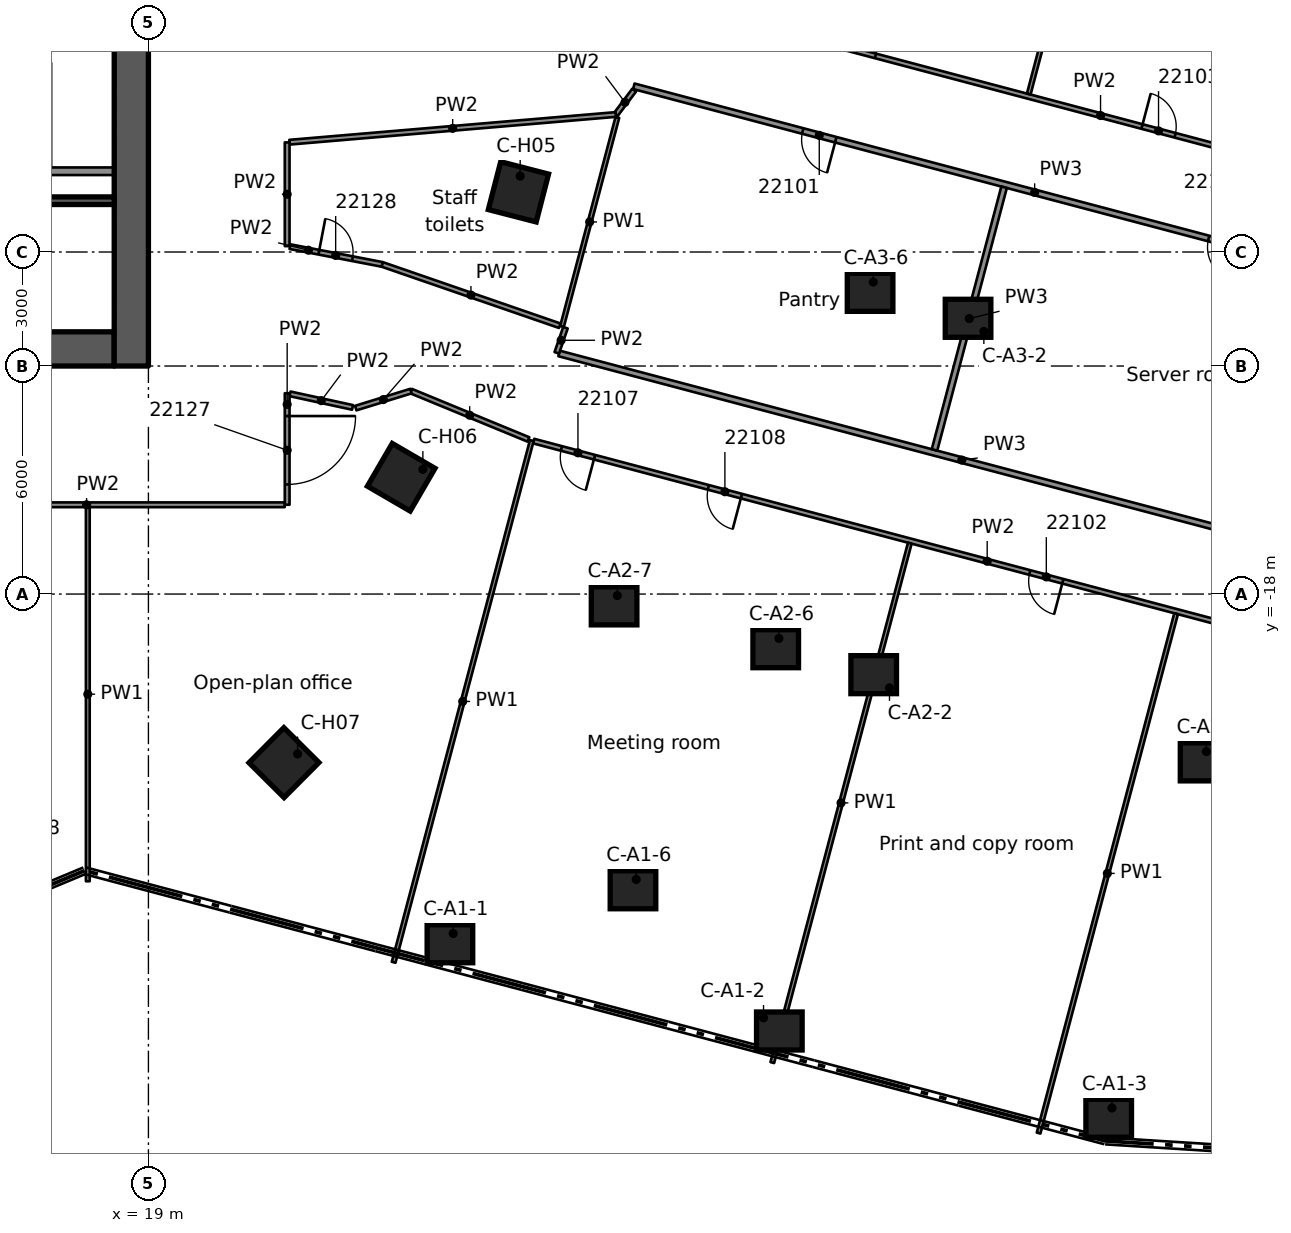
"""IFC4 building model, lengths in metres.
Left out: names, types, materials, properties, quantities, classifications, styles, units other than length and angle.
Written with IfcOpenShell. Run it as: python <this file> out.ifc"""

import sys

from ifc_helpers import new_model, si_unit, direction, frame, frame_2d, origin, origin_2d, place, context, subcontext, project, spatial, rectangle, extrude, element, fill, save


model = new_model("IFC4")
c1 = context("Model", 3, precision=1e-05, world=origin(), true_north=direction((0.0, 1.0)))
c2 = subcontext(c1, "Body", "Model", "MODEL_VIEW")
j1 = project(units=[si_unit("LENGTHUNIT", "METRE"), si_unit("PLANEANGLEUNIT", "RADIAN")], contexts=[c1])
p1 = place(None, origin())
s1 = spatial("IfcSite", under=j1, at=p1, CompositionType="ELEMENT")
p2 = place(p1, origin())
s2 = spatial("IfcBuilding", under=s1, at=p2, CompositionType="ELEMENT")
p3 = place(p2, frame((0.0, 0.0, 116.2)))
s3 = spatial("IfcBuildingStorey", under=s2, at=p3, CompositionType="ELEMENT", Elevation=116.2)
p4 = place(p3, frame((8.9, -11.55, 0.0), z_axis=(0.0, 0.0, 1.0), x_axis=(1.0, 0.0, 0.0)))
e1 = element("IfcWall", 1, at=p4, inside=s3, PredefinedType="SHEAR", context=c2, shape_type="SweptSolid", body=[
    extrude(rectangle(XDim=9.2, YDim=0.9, at=frame_2d((4.6, 0.0))), origin(), (0.0, 0.0, 1.0), 3.5),
])
p5 = place(p4, frame((3.0, 0.0, 0.0)))
e2 = element("IfcOpeningElement", 2, at=p5, cuts=e1, PredefinedType="OPENING", context=c2, shape_type="SweptSolid", body=[
    extrude(rectangle(XDim=1.1, YDim=2.1, at=frame_2d((0.55, 1.05))), frame((0.0, 0.46, 0.0), z_axis=(0.0, -1.0, 0.0), x_axis=(1.0, 0.0, 0.0)), (0.0, 0.0, 1.0), 0.92),
])
p6 = place(p3, frame((18.55, -12.0, 0.0), z_axis=(0.0, 0.0, 1.0), x_axis=(0.0, 1.0, 0.0)))
e3 = element("IfcWall", 3, at=p6, inside=s3, PredefinedType="SHEAR", context=c2, shape_type="SweptSolid", body=[
    extrude(rectangle(XDim=24.0, YDim=0.9, at=frame_2d((12.0, 0.0))), origin(), (0.0, 0.0, 1.0), 3.5),
])
p7 = place(p6, frame((12.1, 0.0, 0.0)))
e4 = element("IfcOpeningElement", 4, at=p7, cuts=e3, PredefinedType="OPENING", context=c2, shape_type="SweptSolid", body=[
    extrude(rectangle(XDim=1.8, YDim=2.1, at=frame_2d((0.9, 1.05))), frame((0.0, 0.46, 0.0), z_axis=(0.0, -1.0, 0.0), x_axis=(1.0, 0.0, 0.0)), (0.0, 0.0, 1.0), 0.92),
])
for number, where, z_axis, x_axis in (
    (5, (26.934, -27.202, 0.0), (0.0, 0.0, 1.0), (1.0, 0.0, 0.0)),
    (6, (35.602, -29.497, 0.0), (0.0, 0.0, 1.0), (1.0, 0.0, 0.0)),
    (7, (44.269, -31.793, 0.0), (0.0, 0.0, 1.0), (1.0, 0.0, 0.0)),
    (8, (31.751, -25.781, 0.0), (0.0, 0.0, 1.0), (1.0, 0.0, 0.0)),
    (9, (38.085, -20.121, 0.0), (0.0, 0.0, 1.0), (1.0, 0.0, 0.0)),
    (10, (46.753, -22.416, 0.0), (0.0, 0.0, 1.0), (1.0, 0.0, 0.0)),
    (11, (35.507, -19.438, 0.0), (0.0, 0.0, 1.0), (1.0, 0.0, 0.0)),
    (12, (31.254, -18.311, 0.0), (0.0, 0.0, 1.0), (1.0, 0.0, 0.0)),
    (13, (40.568, -10.744, 0.0), (0.0, 0.0, 1.0), (1.0, 0.0, 0.0)),
    (14, (37.99, -10.061, 0.0), (0.0, 0.0, 1.0), (1.0, 0.0, 0.0)),
):
    element("IfcColumn", number, at=place(p3, frame(where, z_axis=z_axis, x_axis=x_axis)), inside=s3, PredefinedType="COLUMN", context=c2, shape_type="SweptSolid", body=[
        extrude(rectangle(XDim=1.2, YDim=1.0, at=origin_2d()), origin(), (0.0, 0.0, 1.0), 3.5),
    ])
for number, where, z_axis, x_axis in (
    (15, (28.737, -7.417, 0.0), (0.0, 0.0, 1.0), (0.968, -0.25, 0.0)),
    (16, (25.652, -14.927, 0.0), (0.0, 0.0, 1.0), (0.864, -0.503, 0.0)),
    (17, (22.567, -22.436, 0.0), (0.0, 0.0, 1.0), (0.709, -0.705, 0.0)),
):
    element("IfcColumn", number, at=place(p3, frame(where, z_axis=z_axis, x_axis=x_axis)), inside=s3, PredefinedType="COLUMN", context=c2, shape_type="SweptSolid", body=[
        extrude(rectangle(XDim=1.3, YDim=1.3, at=origin_2d()), origin(), (0.0, 0.0, 1.0), 3.5),
    ])
for number, where, z_axis, x_axis in (
    (18, (11.54, -6.875, 0.0), (0.0, 0.0, 1.0), (1.0, 0.0, 0.0)),
    (19, (11.54, -7.65, 0.0), (0.0, 0.0, 1.0), (1.0, 0.0, 0.0)),
):
    element("IfcWall", number, at=place(p3, frame(where, z_axis=z_axis, x_axis=x_axis)), inside=s3, PredefinedType="SOLIDWALL", context=c2, shape_type="SweptSolid", body=[
        extrude(rectangle(XDim=6.56, YDim=0.2, at=frame_2d((3.28, 0.0))), origin(), (0.0, 0.0, 1.0), 3.09),
    ])
p8 = place(p3, frame((31.782, -4.741, 0.0), z_axis=(0.0, 0.0, 1.0), x_axis=(-0.601653415527, -0.798757264496, 0.0)))
e20 = element("IfcWall", 20, at=p8, inside=s3, PredefinedType="PARTITIONING", context=c2, shape_type="SweptSolid", body=[
    extrude(rectangle(XDim=0.803, YDim=0.125, at=frame_2d((0.401, 0.0))), origin(), (0.0, 0.0, 1.0), 3.08),
])
p9 = place(p3, frame((25.91, -12.659, 0.0), z_axis=(0.0, 0.0, 1.0), x_axis=(0.92457667325, -0.380996030532, 0.0)))
e21 = element("IfcWall", 21, at=p9, inside=s3, PredefinedType="PARTITIONING", context=c2, shape_type="SweptSolid", body=[
    extrude(rectangle(XDim=3.341, YDim=0.125, at=frame_2d((1.67, 0.0))), origin(), (0.0, 0.0, 1.0), 3.08),
])
p10 = place(p3, frame((25.15, -9.326, 0.0), z_axis=(0.0, 0.0, 1.0), x_axis=(0.945231754492, -0.326399954502, 0.0)))
e22 = element("IfcWall", 22, at=p10, inside=s3, PredefinedType="PARTITIONING", context=c2, shape_type="SweptSolid", body=[
    extrude(rectangle(XDim=4.945, YDim=0.125, at=frame_2d((2.472, 0.0))), origin(), (0.0, 0.0, 1.0), 3.08),
])
p11 = place(p3, frame((24.371, -13.089, 0.0), z_axis=(0.0, 0.0, 1.0), x_axis=(-0.977203859463, 0.212303125393, 0.0)))
e23 = element("IfcWall", 23, at=p11, inside=s3, PredefinedType="PARTITIONING", context=c2, shape_type="SweptSolid", body=[
    extrude(rectangle(XDim=1.682, YDim=0.125, at=frame_2d((0.841, 0.0))), origin(), (0.0, 0.0, 1.0), 3.08),
])
p12 = place(p3, frame((53.007, -20.298, 0.0), z_axis=(0.0, 0.0, 1.0), x_axis=(-0.966663351112, 0.256050709074, 0.0)))
e24 = element("IfcWall", 24, at=p12, inside=s3, PredefinedType="PARTITIONING", context=c2, shape_type="SweptSolid", body=[
    extrude(rectangle(XDim=24.694, YDim=0.125, at=frame_2d((12.347, 0.0))), origin(), (0.0, 0.0, 1.0), 3.08),
])
p13 = place(p12, frame((10.288, 0.0, 0.0)))
e25 = element("IfcOpeningElement", 25, at=p13, cuts=e24, PredefinedType="OPENING", context=c2, shape_type="SweptSolid", body=[
    extrude(rectangle(XDim=0.9, YDim=2.1, at=frame_2d((0.45, 1.05))), frame((0.0, 0.073, 0.0), z_axis=(0.0, -1.0, 0.0), x_axis=(1.0, 0.0, 0.0)), (0.0, 0.0, 1.0), 0.145),
])
p14 = place(p12, frame((23.037, 0.0, 0.0)))
e26 = element("IfcOpeningElement", 26, at=p14, cuts=e24, PredefinedType="OPENING", context=c2, shape_type="SweptSolid", body=[
    extrude(rectangle(XDim=0.9, YDim=2.1, at=frame_2d((0.45, 1.05))), frame((0.0, 0.073, 0.0), z_axis=(0.0, -1.0, 0.0), x_axis=(1.0, 0.0, 0.0)), (0.0, 0.0, 1.0), 0.145),
])
p15 = place(p12, frame((19.037, 0.0, 0.0)))
e27 = element("IfcOpeningElement", 27, at=p15, cuts=e24, PredefinedType="OPENING", context=c2, shape_type="SweptSolid", body=[
    extrude(rectangle(XDim=0.9, YDim=2.1, at=frame_2d((0.45, 1.05))), frame((0.0, 0.073, 0.0), z_axis=(0.0, -1.0, 0.0), x_axis=(1.0, 0.0, 0.0)), (0.0, 0.0, 1.0), 0.145),
])
p16 = place(p3, frame((29.806, -11.669, 0.0), z_axis=(0.0, 0.0, 1.0), x_axis=(0.966684240893, -0.255971831282, 0.0)))
e28 = element("IfcWall", 28, at=p16, inside=s3, PredefinedType="PARTITIONING", context=c2, shape_type="SweptSolid", body=[
    extrude(rectangle(XDim=21.925, YDim=0.15, at=frame_2d((10.962, 0.0))), origin(), (0.0, 0.0, 1.0), 3.08),
])
p17 = place(p3, frame((52.868, -10.225, 0.0), z_axis=(0.0, 0.0, 1.0), x_axis=(-0.966680071038, 0.255987578328, 0.0)))
e29 = element("IfcWall", 29, at=p17, inside=s3, PredefinedType="PARTITIONING", context=c2, shape_type="SweptSolid", body=[
    extrude(rectangle(XDim=21.822, YDim=0.15, at=frame_2d((10.911, 0.0))), origin(), (0.0, 0.0, 1.0), 3.08),
])
p18 = place(p17, frame((16.324, 0.0, 0.0)))
e30 = element("IfcOpeningElement", 30, at=p18, cuts=e29, PredefinedType="OPENING", context=c2, shape_type="SweptSolid", body=[
    extrude(rectangle(XDim=0.9, YDim=2.1, at=frame_2d((0.45, 1.05))), frame((0.0, 0.085, 0.0), z_axis=(0.0, -1.0, 0.0), x_axis=(1.0, 0.0, 0.0)), (0.0, 0.0, 1.0), 0.17),
])
p19 = place(p17, frame((5.275, 0.0, 0.0)))
e31 = element("IfcOpeningElement", 31, at=p19, cuts=e29, PredefinedType="OPENING", context=c2, shape_type="SweptSolid", body=[
    extrude(rectangle(XDim=0.9, YDim=2.1, at=frame_2d((0.45, 1.05))), frame((0.0, 0.085, 0.0), z_axis=(0.0, -1.0, 0.0), x_axis=(1.0, 0.0, 0.0)), (0.0, 0.0, 1.0), 0.17),
])
p20 = place(p3, frame((32.234, -2.278, 0.0), z_axis=(0.0, 0.0, 1.0), x_axis=(0.966664542412, -0.256046211541, 0.0)))
e32 = element("IfcWall", 32, at=p20, inside=s3, PredefinedType="PARTITIONING", context=c2, shape_type="SweptSolid", body=[
    extrude(rectangle(XDim=24.456, YDim=0.125, at=frame_2d((12.228, 0.0))), origin(), (0.0, 0.0, 1.0), 3.08),
])
p21 = place(p20, frame((4.3, 0.0, 0.0)))
e33 = element("IfcOpeningElement", 33, at=p21, cuts=e32, PredefinedType="OPENING", context=c2, shape_type="SweptSolid", body=[
    extrude(rectangle(XDim=1.8, YDim=2.1, at=frame_2d((0.9, 1.05))), frame((0.0, 0.073, 0.0), z_axis=(0.0, -1.0, 0.0), x_axis=(1.0, 0.0, 0.0)), (0.0, 0.0, 1.0), 0.145),
])
p22 = place(p20, frame((13.357, 0.0, 0.0)))
e34 = element("IfcOpeningElement", 34, at=p22, cuts=e32, PredefinedType="OPENING", context=c2, shape_type="SweptSolid", body=[
    extrude(rectangle(XDim=0.9, YDim=2.1, at=frame_2d((0.45, 1.05))), frame((0.0, 0.073, 0.0), z_axis=(0.0, -1.0, 0.0), x_axis=(1.0, 0.0, 0.0)), (0.0, 0.0, 1.0), 0.145),
])
p23 = place(p20, frame((19.356, 0.0, 0.0)))
e35 = element("IfcOpeningElement", 35, at=p23, cuts=e32, PredefinedType="OPENING", context=c2, shape_type="SweptSolid", body=[
    extrude(rectangle(XDim=0.9, YDim=2.1, at=frame_2d((0.45, 1.05))), frame((0.0, 0.073, 0.0), z_axis=(0.0, -1.0, 0.0), x_axis=(1.0, 0.0, 0.0)), (0.0, 0.0, 1.0), 0.145),
])
p24 = place(p3, frame((22.725, -8.859, 0.0), z_axis=(0.0, 0.0, 1.0), x_axis=(0.981951400617, -0.189133410127, 0.0)))
e36 = element("IfcWall", 36, at=p24, inside=s3, PredefinedType="PARTITIONING", context=c2, shape_type="SweptSolid", body=[
    extrude(rectangle(XDim=2.469, YDim=0.125, at=frame_2d((1.235, 0.0))), origin(), (0.0, 0.0, 1.0), 3.08),
])
p25 = place(p24, frame((0.774, 0.0, 0.0)))
e37 = element("IfcOpeningElement", 37, at=p25, cuts=e36, PredefinedType="OPENING", context=c2, shape_type="SweptSolid", body=[
    extrude(rectangle(XDim=0.9, YDim=2.1, at=frame_2d((0.45, 1.05))), frame((0.0, 0.073, 0.0), z_axis=(0.0, -1.0, 0.0), x_axis=(1.0, 0.0, 0.0)), (0.0, 0.0, 1.0), 0.145),
])
p26 = place(p3, frame((22.587, -15.651, 0.0), z_axis=(0.0, 0.0, 1.0), x_axis=(-1.0, 0.0, 0.0)))
e38 = element("IfcWall", 38, at=p26, inside=s3, PredefinedType="PARTITIONING", context=c2, shape_type="SweptSolid", body=[
    extrude(rectangle(XDim=10.427, YDim=0.125, at=frame_2d((5.213, 0.0))), origin(), (0.0, 0.0, 1.0), 3.08),
])
p27 = place(p26, frame((7.282, 0.0, 0.0)))
e39 = element("IfcOpeningElement", 39, at=p27, cuts=e38, PredefinedType="OPENING", context=c2, shape_type="SweptSolid", body=[
    extrude(rectangle(XDim=0.9, YDim=2.1, at=frame_2d((0.45, 1.05))), frame((0.0, 0.073, 0.0), z_axis=(0.0, -1.0, 0.0), x_axis=(1.0, 0.0, 0.0)), (0.0, 0.0, 1.0), 0.145),
])
p28 = place(p3, frame((22.713, -6.111, 0.0), z_axis=(0.0, 0.0, 1.0), x_axis=(0.996414999207, 0.084599937093, 0.0)))
e40 = element("IfcWall", 40, at=p28, inside=s3, PredefinedType="PARTITIONING", context=c2, shape_type="SweptSolid", body=[
    extrude(rectangle(XDim=8.617, YDim=0.125, at=frame_2d((4.309, 0.0))), origin(), (0.0, 0.0, 1.0), 3.08),
])
p29 = place(p3, frame((24.455, -13.107, 0.0), z_axis=(0.0, 0.0, 1.0), x_axis=(0.955713098299, 0.294299972374, 0.0)))
e41 = element("IfcWall", 41, at=p29, inside=s3, PredefinedType="PARTITIONING", context=c2, shape_type="SweptSolid", body=[
    extrude(rectangle(XDim=1.522, YDim=0.125, at=frame_2d((0.761, 0.0))), origin(), (0.0, 0.0, 1.0), 3.08),
])
p30 = place(p3, frame((29.746, -11.653, 0.0), z_axis=(0.0, 0.0, 1.0), x_axis=(0.326055233701, 0.945350720408, 0.0)))
e42 = element("IfcWall", 42, at=p30, inside=s3, PredefinedType="PARTITIONING", context=c2, shape_type="SweptSolid", body=[
    extrude(rectangle(XDim=0.699, YDim=0.125, at=frame_2d((0.35, 0.0))), origin(), (0.0, 0.0, 1.0), 3.08),
])
p31 = place(p3, frame((42.424, -32.183, 0.0), z_axis=(0.0, 0.0, 1.0), x_axis=(0.255986543434, 0.966680345089, 0.0)))
e43 = element("IfcWall", 43, at=p31, inside=s3, PredefinedType="PARTITIONING", context=c2, shape_type="SweptSolid", body=[
    extrude(rectangle(XDim=14.137, YDim=0.1, at=frame_2d((7.068, 0.0))), origin(), (0.0, 0.0, 1.0), 3.08),
])
p32 = place(p3, frame((35.417, -30.328, 0.0), z_axis=(0.0, 0.0, 1.0), x_axis=(0.255904901066, 0.966701961108, 0.0)))
e44 = element("IfcWall", 44, at=p32, inside=s3, PredefinedType="PARTITIONING", context=c2, shape_type="SweptSolid", body=[
    extrude(rectangle(XDim=14.138, YDim=0.1, at=frame_2d((7.069, 0.0))), origin(), (0.0, 0.0, 1.0), 3.08),
])
p33 = place(p3, frame((39.685, -14.208, 0.0), z_axis=(0.0, 0.0, 1.0), x_axis=(0.256072738338, 0.966657515711, 0.0)))
e45 = element("IfcWall", 45, at=p33, inside=s3, PredefinedType="PARTITIONING", context=c2, shape_type="SweptSolid", body=[
    extrude(rectangle(XDim=7.151, YDim=0.15, at=frame_2d((3.575, 0.0))), origin(), (0.0, 0.0, 1.0), 3.08),
])
p34 = place(p3, frame((42.165, -4.844, 0.0), z_axis=(0.0, 0.0, 1.0), x_axis=(0.25596945064, 0.966684871268, 0.0)))
e46 = element("IfcWall", 46, at=p34, inside=s3, PredefinedType="PARTITIONING", context=c2, shape_type="SweptSolid", body=[
    extrude(rectangle(XDim=14.138, YDim=0.1, at=frame_2d((7.069, 0.0))), origin(), (0.0, 0.0, 1.0), 2.445),
])
p35 = place(p3, frame((25.453, -27.689, 0.0), z_axis=(0.0, 0.0, 1.0), x_axis=(0.255983290364, 0.966681206528, 0.0)))
e47 = element("IfcWall", 47, at=p35, inside=s3, PredefinedType="PARTITIONING", context=c2, shape_type="SweptSolid", body=[
    extrude(rectangle(XDim=14.2, YDim=0.1, at=frame_2d((7.1, 0.0))), origin(), (0.0, 0.0, 1.0), 3.08),
])
p36 = place(p3, frame((29.883, -10.96, 0.0), z_axis=(0.0, 0.0, 1.0), x_axis=(0.255996310915, 0.96667775851, 0.0)))
e48 = element("IfcWall", 48, at=p36, inside=s3, PredefinedType="PARTITIONING", context=c2, shape_type="SweptSolid", body=[
    extrude(rectangle(XDim=5.692, YDim=0.1, at=frame_2d((2.846, 0.0))), origin(), (0.0, 0.0, 1.0), 3.08),
])
p37 = place(p3, frame((22.651, -12.716, 0.0), z_axis=(0.0, 0.0, 1.0), x_axis=(0.0, -1.0, 0.0)))
e49 = element("IfcWall", 49, at=p37, inside=s3, PredefinedType="PARTITIONING", context=c2, shape_type="SweptSolid", body=[
    extrude(rectangle(XDim=2.934, YDim=0.125, at=frame_2d((1.467, 0.0))), origin(), (0.0, 0.0, 1.0), 3.08),
])
p38 = place(p37, frame((0.6, 0.0, 0.0)))
e50 = element("IfcOpeningElement", 50, at=p38, cuts=e49, PredefinedType="OPENING", context=c2, shape_type="SweptSolid", body=[
    extrude(rectangle(XDim=1.8, YDim=2.1, at=frame_2d((0.9, 1.05))), frame((0.0, 0.073, 0.0), z_axis=(0.0, -1.0, 0.0), x_axis=(1.0, 0.0, 0.0)), (0.0, 0.0, 1.0), 0.145),
])
p39 = place(p3, frame((22.651, -8.845, 0.0), z_axis=(0.0, 0.0, 1.0), x_axis=(0.0, 1.0, 0.0)))
e51 = element("IfcWall", 51, at=p39, inside=s3, PredefinedType="PARTITIONING", context=c2, shape_type="SweptSolid", body=[
    extrude(rectangle(XDim=2.729, YDim=0.125, at=frame_2d((1.365, 0.0))), origin(), (0.0, 0.0, 1.0), 3.08),
])
p40 = place(p3, frame((17.405, -25.557, 0.0), z_axis=(0.0, 0.0, 1.0), x_axis=(0.0, 1.0, 0.0)))
e52 = element("IfcWall", 52, at=p40, inside=s3, PredefinedType="PARTITIONING", context=c2, shape_type="SweptSolid", body=[
    extrude(rectangle(XDim=9.844, YDim=0.1, at=frame_2d((4.922, 0.0))), origin(), (0.0, 0.0, 1.0), 3.08),
])
p41 = place(p21, origin())
e53 = element("IfcDoor", 53, at=p41, inside=s3, OperationType="DOUBLE_DOOR_SINGLE_SWING", PredefinedType="DOOR", context=c2, shape_type="SweptSolid", body=[
    extrude(rectangle(XDim=1.8, YDim=2.1, at=frame_2d((0.9, 1.05))), frame((0.0, 0.025, 0.0), z_axis=(0.0, -1.0, 0.0), x_axis=(1.0, 0.0, 0.0)), (0.0, 0.0, 1.0), 0.05),
])
fill(e33, e53)
p42 = place(p18, origin())
e54 = element("IfcDoor", 54, at=p42, inside=s3, OperationType="SINGLE_SWING_RIGHT", PredefinedType="DOOR", context=c2, shape_type="SweptSolid", body=[
    extrude(rectangle(XDim=0.9, YDim=2.1, at=frame_2d((0.45, 1.05))), frame((0.0, 0.025, 0.0), z_axis=(0.0, -1.0, 0.0), x_axis=(1.0, 0.0, 0.0)), (0.0, 0.0, 1.0), 0.05),
])
fill(e30, e54)
p43 = place(p13, origin())
e55 = element("IfcDoor", 55, at=p43, inside=s3, OperationType="SINGLE_SWING_LEFT", PredefinedType="DOOR", context=c2, shape_type="SweptSolid", body=[
    extrude(rectangle(XDim=0.9, YDim=2.1, at=frame_2d((0.45, 1.05))), frame((0.0, 0.025, 0.0), z_axis=(0.0, -1.0, 0.0), x_axis=(1.0, 0.0, 0.0)), (0.0, 0.0, 1.0), 0.05),
])
fill(e25, e55)
p44 = place(p22, origin())
e56 = element("IfcDoor", 56, at=p44, inside=s3, OperationType="SINGLE_SWING_RIGHT", PredefinedType="DOOR", context=c2, shape_type="SweptSolid", body=[
    extrude(rectangle(XDim=0.9, YDim=2.1, at=frame_2d((0.45, 1.05))), frame((0.0, 0.025, 0.0), z_axis=(0.0, -1.0, 0.0), x_axis=(1.0, 0.0, 0.0)), (0.0, 0.0, 1.0), 0.05),
])
fill(e34, e56)
p45 = place(p19, origin())
e57 = element("IfcDoor", 57, at=p45, inside=s3, OperationType="SINGLE_SWING_LEFT", PredefinedType="DOOR", context=c2, shape_type="SweptSolid", body=[
    extrude(rectangle(XDim=0.9, YDim=2.1, at=frame_2d((0.45, 1.05))), frame((0.0, 0.025, 0.0), z_axis=(0.0, -1.0, 0.0), x_axis=(1.0, 0.0, 0.0)), (0.0, 0.0, 1.0), 0.05),
])
fill(e31, e57)
p46 = place(p14, origin())
e58 = element("IfcDoor", 58, at=p46, inside=s3, OperationType="SINGLE_SWING_RIGHT", PredefinedType="DOOR", context=c2, shape_type="SweptSolid", body=[
    extrude(rectangle(XDim=0.9, YDim=2.1, at=frame_2d((0.45, 1.05))), frame((0.0, 0.025, 0.0), z_axis=(0.0, -1.0, 0.0), x_axis=(1.0, 0.0, 0.0)), (0.0, 0.0, 1.0), 0.05),
])
fill(e26, e58)
p47 = place(p15, origin())
e59 = element("IfcDoor", 59, at=p47, inside=s3, OperationType="SINGLE_SWING_RIGHT", PredefinedType="DOOR", context=c2, shape_type="SweptSolid", body=[
    extrude(rectangle(XDim=0.9, YDim=2.1, at=frame_2d((0.45, 1.05))), frame((0.0, 0.025, 0.0), z_axis=(0.0, -1.0, 0.0), x_axis=(1.0, 0.0, 0.0)), (0.0, 0.0, 1.0), 0.05),
])
fill(e27, e59)
p48 = place(p38, origin())
e60 = element("IfcDoor", 60, at=p48, inside=s3, OperationType="DOUBLE_DOOR_SINGLE_SWING", PredefinedType="DOOR", context=c2, shape_type="SweptSolid", body=[
    extrude(rectangle(XDim=1.8, YDim=2.1, at=frame_2d((0.9, 1.05))), frame((0.0, 0.025, 0.0), z_axis=(0.0, -1.0, 0.0), x_axis=(1.0, 0.0, 0.0)), (0.0, 0.0, 1.0), 0.05),
])
fill(e50, e60)
p49 = place(p25, origin())
e61 = element("IfcDoor", 61, at=p49, inside=s3, OperationType="SINGLE_SWING_LEFT", PredefinedType="DOOR", context=c2, shape_type="SweptSolid", body=[
    extrude(rectangle(XDim=0.9, YDim=2.1, at=frame_2d((0.45, 1.05))), frame((0.0, 0.025, 0.0), z_axis=(0.0, -1.0, 0.0), x_axis=(1.0, 0.0, 0.0)), (0.0, 0.0, 1.0), 0.05),
])
fill(e37, e61)
save(model, sys.argv[1])
